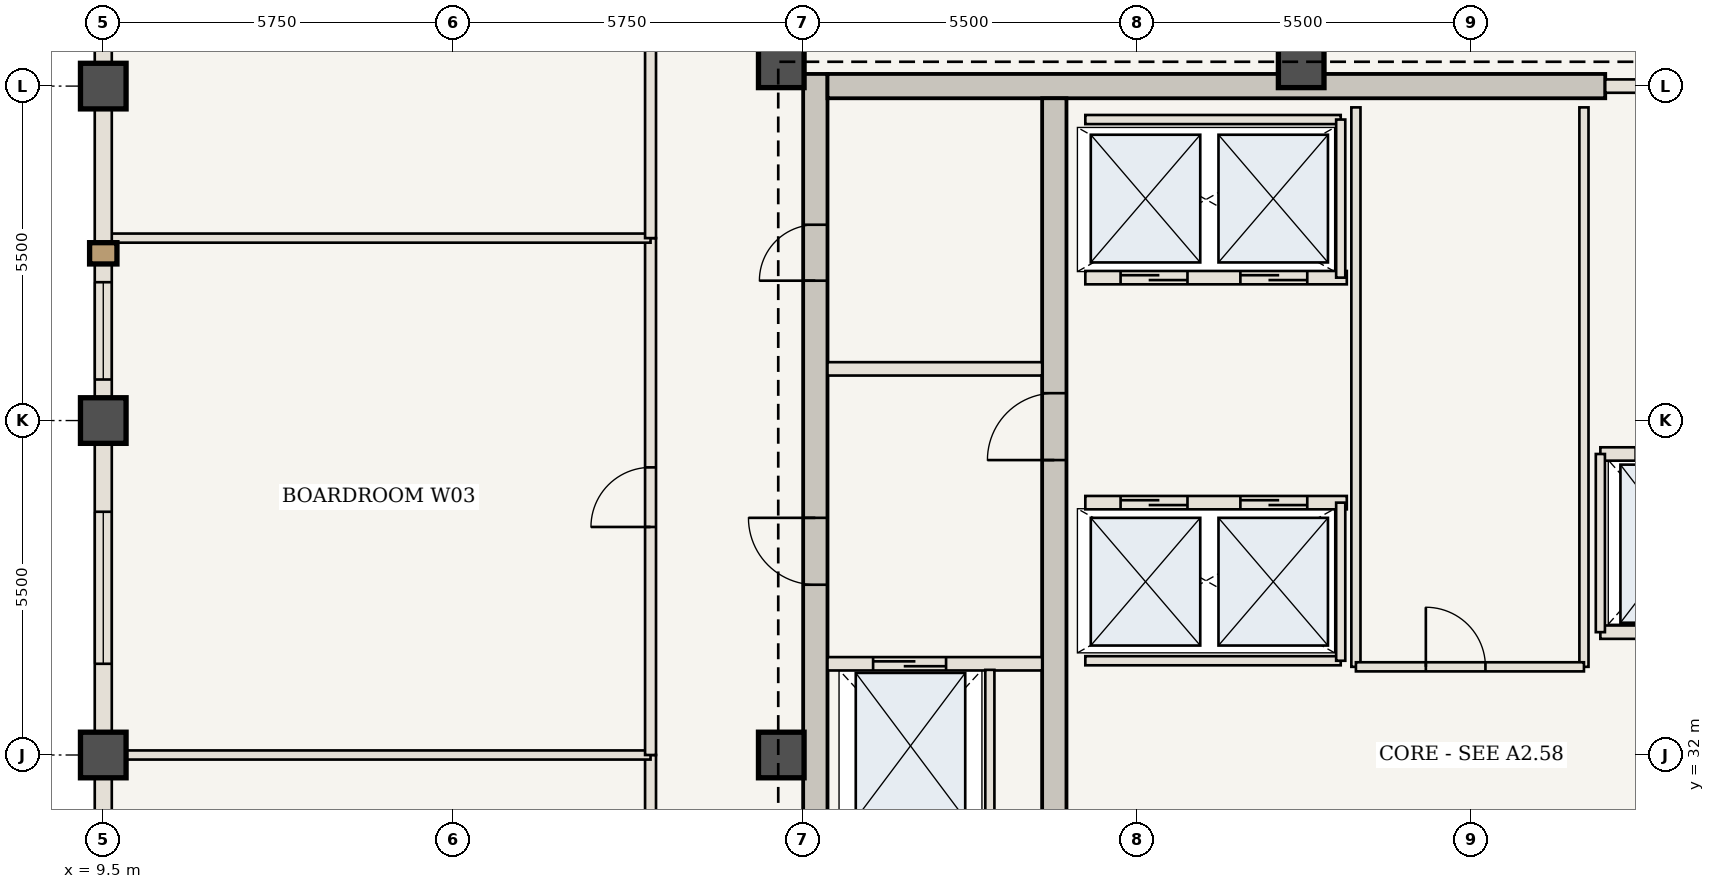
"""IFC4 building model, lengths in metres.
Left out: names, types, materials, properties, quantities, classifications, styles, units other than length and angle.
Written with IfcOpenShell. Run it as: python <this file> out.ifc"""

import sys

from ifc_helpers import new_model, si_unit, direction, frame, frame_2d, origin, origin_2d, place, context, subcontext, project, spatial, rectangle, extrude, element, fill, save


model = new_model("IFC4")
c1 = context("Model", 3, precision=1e-05, world=origin(), true_north=direction((0.0, 1.0)))
c2 = subcontext(c1, "Body", "Model", "MODEL_VIEW")
j1 = project(units=[si_unit("LENGTHUNIT", "METRE"), si_unit("PLANEANGLEUNIT", "RADIAN")], contexts=[c1])
p1 = place(None, origin())
s1 = spatial("IfcSite", under=j1, at=p1, CompositionType="ELEMENT")
p2 = place(p1, origin())
s2 = spatial("IfcBuilding", under=s1, at=p2, CompositionType="ELEMENT")
p3 = place(p2, frame((0.0, 0.0, 262.15)))
s3 = spatial("IfcBuildingStorey", under=s2, at=p3, CompositionType="ELEMENT", Elevation=262.15)
p4 = place(p3, frame((21.21, 30.6, 0.0), z_axis=(0.0, 0.0, 1.0), x_axis=(0.0, 1.0, 0.0)))
e1 = element("IfcWall", 1, at=p4, inside=s3, PredefinedType="SHEAR", context=c2, shape_type="SweptSolid", body=[
    extrude(rectangle(XDim=12.6, YDim=0.4, at=frame_2d((6.3, 0.0))), origin(), (0.0, 0.0, 1.0), 3.85),
])
p5 = place(p4, frame((4.2, 0.0, 0.0)))
e2 = element("IfcOpeningElement", 2, at=p5, cuts=e1, PredefinedType="OPENING", context=c2, shape_type="SweptSolid", body=[
    extrude(rectangle(XDim=1.1, YDim=2.15, at=frame_2d((0.55, 1.075))), frame((0.0, 0.21, 0.0), z_axis=(0.0, -1.0, 0.0), x_axis=(1.0, 0.0, 0.0)), (0.0, 0.0, 1.0), 0.42),
])
p6 = place(p4, frame((9.2, 0.0, 0.0)))
e3 = element("IfcOpeningElement", 3, at=p6, cuts=e1, PredefinedType="OPENING", context=c2, shape_type="SweptSolid", body=[
    extrude(rectangle(XDim=0.92, YDim=2.1, at=frame_2d((0.46, 1.05))), frame((0.0, 0.21, 0.0), z_axis=(0.0, -1.0, 0.0), x_axis=(1.0, 0.0, 0.0)), (0.0, 0.0, 1.0), 0.42),
])
p7 = place(p3, frame((21.41, 43.0, 0.0), z_axis=(0.0, 0.0, 1.0), x_axis=(1.0, 0.0, 0.0)))
e4 = element("IfcWall", 4, at=p7, inside=s3, PredefinedType="SHEAR", context=c2, shape_type="SweptSolid", body=[
    extrude(rectangle(XDim=12.79, YDim=0.4, at=frame_2d((6.395, 0.0))), origin(), (0.0, 0.0, 1.0), 3.85),
])
p8 = place(p3, frame((25.14, 30.6, 0.0), z_axis=(0.0, 0.0, 1.0), x_axis=(0.0, 1.0, 0.0)))
e5 = element("IfcWall", 5, at=p8, inside=s3, PredefinedType="SHEAR", context=c2, shape_type="SweptSolid", body=[
    extrude(rectangle(XDim=12.2, YDim=0.4, at=frame_2d((6.1, 0.0))), origin(), (0.0, 0.0, 1.0), 3.85),
])
p9 = place(p8, frame((6.25, 0.0, 0.0)))
e6 = element("IfcOpeningElement", 6, at=p9, cuts=e5, PredefinedType="OPENING", context=c2, shape_type="SweptSolid", body=[
    extrude(rectangle(XDim=1.1, YDim=2.15, at=frame_2d((0.55, 1.075))), frame((0.0, 0.21, 0.0), z_axis=(0.0, -1.0, 0.0), x_axis=(1.0, 0.0, 0.0)), (0.0, 0.0, 1.0), 0.42),
])
for number, where, z_axis, x_axis in (
    (7, (29.2, 43.35, 0.0), (0.0, 0.0, 1.0), (1.0, 0.0, 0.0)),
    (8, (20.65, 43.35, 0.0), (0.0, 0.0, 1.0), (1.0, 0.0, 0.0)),
    (9, (20.65, 32.0, 0.0), (0.0, 0.0, 1.0), (1.0, 0.0, 0.0)),
    (10, (9.5, 32.0, 0.0), (0.0, 0.0, 1.0), (1.0, 0.0, 0.0)),
    (11, (9.5, 37.5, 0.0), (0.0, 0.0, 1.0), (1.0, 0.0, 0.0)),
    (12, (9.5, 43.0, 0.0), (0.0, 0.0, 1.0), (1.0, 0.0, 0.0)),
):
    element("IfcColumn", number, at=place(p3, frame(where, z_axis=z_axis, x_axis=x_axis)), inside=s3, PredefinedType="COLUMN", context=c2, shape_type="SweptSolid", body=[
        extrude(rectangle(XDim=0.75, YDim=0.75, at=origin_2d()), origin(), (0.0, 0.0, 1.0), 3.85),
    ])
p10 = place(p3, frame((21.41, 33.5, 0.0), z_axis=(0.0, 0.0, 1.0), x_axis=(1.0, 0.0, 0.0)))
e13 = element("IfcWall", 13, at=p10, inside=s3, PredefinedType="STANDARD", context=c2, shape_type="SweptSolid", body=[
    extrude(rectangle(XDim=3.53, YDim=0.22, at=frame_2d((1.765, 0.0))), origin(), (0.0, 0.0, 1.0), 3.43),
])
p11 = place(p10, frame((0.75, 0.0, 0.0)))
e14 = element("IfcOpeningElement", 14, at=p11, cuts=e13, PredefinedType="OPENING", context=c2, shape_type="SweptSolid", body=[
    extrude(rectangle(XDim=1.2, YDim=2.2, at=frame_2d((0.6, 1.1))), frame((0.0, 0.12, 0.0), z_axis=(0.0, -1.0, 0.0), x_axis=(1.0, 0.0, 0.0)), (0.0, 0.0, 1.0), 0.24),
])
p12 = place(p3, frame((24.08, 30.75, 0.0), z_axis=(0.0, 0.0, 1.0), x_axis=(0.0, 1.0, 0.0)))
e15 = element("IfcWall", 15, at=p12, inside=s3, PredefinedType="STANDARD", context=c2, shape_type="SweptSolid", body=[
    extrude(rectangle(XDim=2.65, YDim=0.15, at=frame_2d((1.325, 0.0))), origin(), (0.0, 0.0, 1.0), 3.43),
])
p13 = place(p3, frame((21.41, 38.35, 0.0), z_axis=(0.0, 0.0, 1.0), x_axis=(1.0, 0.0, 0.0)))
e16 = element("IfcWall", 16, at=p13, inside=s3, PredefinedType="STANDARD", context=c2, shape_type="SweptSolid", body=[
    extrude(rectangle(XDim=3.53, YDim=0.22, at=frame_2d((1.765, 0.0))), origin(), (0.0, 0.0, 1.0), 3.43),
])
p14 = place(p3, frame((25.65, 36.15, 0.0), z_axis=(0.0, 0.0, 1.0), x_axis=(1.0, 0.0, 0.0)))
e17 = element("IfcWall", 17, at=p14, inside=s3, PredefinedType="STANDARD", context=c2, shape_type="SweptSolid", body=[
    extrude(rectangle(XDim=4.3, YDim=0.22, at=frame_2d((2.15, 0.0))), origin(), (0.0, 0.0, 1.0), 3.43),
])
p15 = place(p14, frame((0.58, 0.0, 0.0)))
e18 = element("IfcOpeningElement", 18, at=p15, cuts=e17, PredefinedType="OPENING", context=c2, shape_type="SweptSolid", body=[
    extrude(rectangle(XDim=1.1, YDim=2.15, at=frame_2d((0.55, 1.075))), frame((0.0, 0.12, 0.0), z_axis=(0.0, -1.0, 0.0), x_axis=(1.0, 0.0, 0.0)), (0.0, 0.0, 1.0), 0.24),
])
p16 = place(p14, frame((2.55, 0.0, 0.0)))
e19 = element("IfcOpeningElement", 19, at=p16, cuts=e17, PredefinedType="OPENING", context=c2, shape_type="SweptSolid", body=[
    extrude(rectangle(XDim=1.1, YDim=2.15, at=frame_2d((0.55, 1.075))), frame((0.0, 0.12, 0.0), z_axis=(0.0, -1.0, 0.0), x_axis=(1.0, 0.0, 0.0)), (0.0, 0.0, 1.0), 0.24),
])
p17 = place(p3, frame((25.65, 33.55, 0.0), z_axis=(0.0, 0.0, 1.0), x_axis=(1.0, 0.0, 0.0)))
e20 = element("IfcWall", 20, at=p17, inside=s3, PredefinedType="STANDARD", context=c2, shape_type="SweptSolid", body=[
    extrude(rectangle(XDim=4.2, YDim=0.15, at=frame_2d((2.1, 0.0))), origin(), (0.0, 0.0, 1.0), 3.43),
])
p18 = place(p3, frame((29.85, 33.55, 0.0), z_axis=(0.0, 0.0, 1.0), x_axis=(0.0, 1.0, 0.0)))
e21 = element("IfcWall", 21, at=p18, inside=s3, PredefinedType="STANDARD", context=c2, shape_type="SweptSolid", body=[
    extrude(rectangle(XDim=2.6, YDim=0.15, at=frame_2d((1.3, 0.0))), origin(), (0.0, 0.0, 1.0), 3.43),
])
p19 = place(p3, frame((25.65, 39.85, 0.0), z_axis=(0.0, 0.0, 1.0), x_axis=(1.0, 0.0, 0.0)))
e22 = element("IfcWall", 22, at=p19, inside=s3, PredefinedType="STANDARD", context=c2, shape_type="SweptSolid", body=[
    extrude(rectangle(XDim=4.3, YDim=0.22, at=frame_2d((2.15, 0.0))), origin(), (0.0, 0.0, 1.0), 3.43),
])
p20 = place(p19, frame((0.58, 0.0, 0.0)))
e23 = element("IfcOpeningElement", 23, at=p20, cuts=e22, PredefinedType="OPENING", context=c2, shape_type="SweptSolid", body=[
    extrude(rectangle(XDim=1.1, YDim=2.15, at=frame_2d((0.55, 1.075))), frame((0.0, 0.12, 0.0), z_axis=(0.0, -1.0, 0.0), x_axis=(1.0, 0.0, 0.0)), (0.0, 0.0, 1.0), 0.24),
])
p21 = place(p19, frame((2.55, 0.0, 0.0)))
e24 = element("IfcOpeningElement", 24, at=p21, cuts=e22, PredefinedType="OPENING", context=c2, shape_type="SweptSolid", body=[
    extrude(rectangle(XDim=1.1, YDim=2.15, at=frame_2d((0.55, 1.075))), frame((0.0, 0.12, 0.0), z_axis=(0.0, -1.0, 0.0), x_axis=(1.0, 0.0, 0.0)), (0.0, 0.0, 1.0), 0.24),
])
p22 = place(p3, frame((25.65, 42.45, 0.0), z_axis=(0.0, 0.0, 1.0), x_axis=(1.0, 0.0, 0.0)))
e25 = element("IfcWall", 25, at=p22, inside=s3, PredefinedType="STANDARD", context=c2, shape_type="SweptSolid", body=[
    extrude(rectangle(XDim=4.2, YDim=0.15, at=frame_2d((2.1, 0.0))), origin(), (0.0, 0.0, 1.0), 3.43),
])
p23 = place(p3, frame((29.85, 39.85, 0.0), z_axis=(0.0, 0.0, 1.0), x_axis=(0.0, 1.0, 0.0)))
e26 = element("IfcWall", 26, at=p23, inside=s3, PredefinedType="STANDARD", context=c2, shape_type="SweptSolid", body=[
    extrude(rectangle(XDim=2.6, YDim=0.15, at=frame_2d((1.3, 0.0))), origin(), (0.0, 0.0, 1.0), 3.43),
])
for number, where, z_axis, x_axis in (
    (27, (30.1, 33.45, 0.0), (0.0, 0.0, 1.0), (0.0, 1.0, 0.0)),
    (28, (33.85, 33.45, 0.0), (0.0, 0.0, 1.0), (0.0, 1.0, 0.0)),
):
    element("IfcWall", number, at=place(p3, frame(where, z_axis=z_axis, x_axis=x_axis)), inside=s3, PredefinedType="STANDARD", context=c2, shape_type="SweptSolid", body=[
        extrude(rectangle(XDim=9.2, YDim=0.15, at=frame_2d((4.6, 0.0))), origin(), (0.0, 0.0, 1.0), 3.43),
    ])
p24 = place(p3, frame((30.1, 33.45, 0.0), z_axis=(0.0, 0.0, 1.0), x_axis=(1.0, 0.0, 0.0)))
e29 = element("IfcWall", 29, at=p24, inside=s3, PredefinedType="STANDARD", context=c2, shape_type="SweptSolid", body=[
    extrude(rectangle(XDim=3.75, YDim=0.15, at=frame_2d((1.875, 0.0))), origin(), (0.0, 0.0, 1.0), 3.43),
])
p25 = place(p24, frame((1.15, 0.0, 0.0)))
e30 = element("IfcOpeningElement", 30, at=p25, cuts=e29, PredefinedType="OPENING", context=c2, shape_type="SweptSolid", body=[
    extrude(rectangle(XDim=0.98, YDim=2.2, at=frame_2d((0.49, 1.1))), frame((0.0, 0.085, 0.0), z_axis=(0.0, -1.0, 0.0), x_axis=(1.0, 0.0, 0.0)), (0.0, 0.0, 1.0), 0.17),
])
p26 = place(p3, frame((34.2, 43.0, 0.0), z_axis=(0.0, 0.0, 1.0), x_axis=(1.0, 0.0, 0.0)))
e31 = element("IfcWall", 31, at=p26, inside=s3, PredefinedType="STANDARD", context=c2, shape_type="SweptSolid", body=[
    extrude(rectangle(XDim=3.55, YDim=0.22, at=frame_2d((1.775, 0.0))), origin(), (0.0, 0.0, 1.0), 3.43),
])
p27 = place(p26, frame((1.4, 0.0, 0.0)))
e32 = element("IfcOpeningElement", 32, at=p27, cuts=e31, PredefinedType="OPENING", context=c2, shape_type="SweptSolid", body=[
    extrude(rectangle(XDim=1.1, YDim=2.15, at=frame_2d((0.55, 1.075))), frame((0.0, 0.12, 0.0), z_axis=(0.0, -1.0, 0.0), x_axis=(1.0, 0.0, 0.0)), (0.0, 0.0, 1.0), 0.24),
])
p28 = place(p3, frame((34.12, 36.95, 0.0), z_axis=(0.0, 0.0, 1.0), x_axis=(1.0, 0.0, 0.0)))
e33 = element("IfcWall", 33, at=p28, inside=s3, PredefinedType="STANDARD", context=c2, shape_type="SweptSolid", body=[
    extrude(rectangle(XDim=2.68, YDim=0.22, at=frame_2d((1.34, 0.0))), origin(), (0.0, 0.0, 1.0), 3.43),
])
p29 = place(p28, frame((0.58, 0.0, 0.0)))
e34 = element("IfcOpeningElement", 34, at=p29, cuts=e33, PredefinedType="OPENING", context=c2, shape_type="SweptSolid", body=[
    extrude(rectangle(XDim=1.2, YDim=2.2, at=frame_2d((0.6, 1.1))), frame((0.0, 0.12, 0.0), z_axis=(0.0, -1.0, 0.0), x_axis=(1.0, 0.0, 0.0)), (0.0, 0.0, 1.0), 0.24),
])
p30 = place(p3, frame((34.12, 34.02, 0.0), z_axis=(0.0, 0.0, 1.0), x_axis=(1.0, 0.0, 0.0)))
e35 = element("IfcWall", 35, at=p30, inside=s3, PredefinedType="STANDARD", context=c2, shape_type="SweptSolid", body=[
    extrude(rectangle(XDim=2.68, YDim=0.22, at=frame_2d((1.34, 0.0))), origin(), (0.0, 0.0, 1.0), 3.43),
])
p31 = place(p3, frame((34.12, 34.02, 0.0), z_axis=(0.0, 0.0, 1.0), x_axis=(0.0, 1.0, 0.0)))
e36 = element("IfcWall", 36, at=p31, inside=s3, PredefinedType="STANDARD", context=c2, shape_type="SweptSolid", body=[
    extrude(rectangle(XDim=2.93, YDim=0.15, at=frame_2d((1.465, 0.0))), origin(), (0.0, 0.0, 1.0), 3.43),
])
p32 = place(p3, frame((18.5, 23.5, 0.0), z_axis=(0.0, 0.0, 1.0), x_axis=(0.0, 1.0, 0.0)))
e37 = element("IfcWall", 37, at=p32, inside=s3, PredefinedType="STANDARD", context=c2, shape_type="SweptSolid", body=[
    extrude(rectangle(XDim=8.5, YDim=0.18, at=frame_2d((4.25, 0.0))), origin(), (0.0, 0.0, 1.0), 3.43),
])
p33 = place(p32, frame((3.75, 0.0, 0.0)))
e38 = element("IfcOpeningElement", 38, at=p33, cuts=e37, PredefinedType="OPENING", context=c2, shape_type="SweptSolid", body=[
    extrude(rectangle(XDim=0.98, YDim=2.2, at=frame_2d((0.49, 1.1))), frame((0.0, 0.1, 0.0), z_axis=(0.0, -1.0, 0.0), x_axis=(1.0, 0.0, 0.0)), (0.0, 0.0, 1.0), 0.2),
])
p34 = place(p3, frame((9.56, 32.0, 0.0), z_axis=(0.0, 0.0, 1.0), x_axis=(1.0, 0.0, 0.0)))
e39 = element("IfcWall", 39, at=p34, inside=s3, PredefinedType="STANDARD", context=c2, shape_type="SweptSolid", body=[
    extrude(rectangle(XDim=8.94, YDim=0.15, at=frame_2d((4.47, 0.0))), origin(), (0.0, 0.0, 1.0), 2.885),
])
p35 = place(p3, frame((18.5, 32.0, 0.0), z_axis=(0.0, 0.0, 1.0), x_axis=(0.0, 1.0, 0.0)))
e40 = element("IfcWall", 40, at=p35, inside=s3, PredefinedType="STANDARD", context=c2, shape_type="SweptSolid", body=[
    extrude(rectangle(XDim=8.5, YDim=0.18, at=frame_2d((4.25, 0.0))), origin(), (0.0, 0.0, 1.0), 3.43),
])
p36 = place(p35, frame((3.75, 0.0, 0.0)))
e41 = element("IfcOpeningElement", 41, at=p36, cuts=e40, PredefinedType="OPENING", context=c2, shape_type="SweptSolid", body=[
    extrude(rectangle(XDim=0.98, YDim=2.2, at=frame_2d((0.49, 1.1))), frame((0.0, 0.1, 0.0), z_axis=(0.0, -1.0, 0.0), x_axis=(1.0, 0.0, 0.0)), (0.0, 0.0, 1.0), 0.2),
])
p37 = place(p3, frame((9.56, 40.5, 0.0), z_axis=(0.0, 0.0, 1.0), x_axis=(1.0, 0.0, 0.0)))
e42 = element("IfcWall", 42, at=p37, inside=s3, PredefinedType="STANDARD", context=c2, shape_type="SweptSolid", body=[
    extrude(rectangle(XDim=8.94, YDim=0.15, at=frame_2d((4.47, 0.0))), origin(), (0.0, 0.0, 1.0), 3.43),
])
p38 = place(p3, frame((18.5, 40.5, 0.0), z_axis=(0.0, 0.0, 1.0), x_axis=(0.0, 1.0, 0.0)))
e43 = element("IfcWall", 43, at=p38, inside=s3, PredefinedType="STANDARD", context=c2, shape_type="SweptSolid", body=[
    extrude(rectangle(XDim=8.0, YDim=0.18, at=frame_2d((4.0, 0.0))), origin(), (0.0, 0.0, 1.0), 3.43),
])
p39 = place(p38, frame((4.95, 0.0, 0.0)))
e44 = element("IfcOpeningElement", 44, at=p39, cuts=e43, PredefinedType="OPENING", context=c2, shape_type="SweptSolid", body=[
    extrude(rectangle(XDim=0.98, YDim=2.2, at=frame_2d((0.49, 1.1))), frame((0.0, 0.1, 0.0), z_axis=(0.0, -1.0, 0.0), x_axis=(1.0, 0.0, 0.0)), (0.0, 0.0, 1.0), 0.2),
])
p40 = place(p3, frame((9.5, 26.5, 0.0), z_axis=(0.0, 0.0, 1.0), x_axis=(0.0, 1.0, 0.0)))
e45 = element("IfcWall", 45, at=p40, inside=s3, PredefinedType="USERDEFINED", context=c2, shape_type="SweptSolid", body=[
    extrude(rectangle(XDim=5.5, YDim=0.28, at=frame_2d((2.75, 0.0))), origin(), (0.0, 0.0, 1.0), 2.73),
])
p41 = place(p40, frame((1.5, 0.0, 0.85)))
e46 = element("IfcOpeningElement", 46, at=p41, cuts=e45, PredefinedType="OPENING", context=c2, shape_type="SweptSolid", body=[
    extrude(rectangle(XDim=2.5, YDim=1.68, at=frame_2d((1.25, 0.84))), frame((0.0, 0.15, 0.0), z_axis=(0.0, -1.0, 0.0), x_axis=(1.0, 0.0, 0.0)), (0.0, 0.0, 1.0), 0.3),
])
p42 = place(p3, frame((9.5, 32.0, 0.0), z_axis=(0.0, 0.0, 1.0), x_axis=(0.0, 1.0, 0.0)))
e47 = element("IfcWall", 47, at=p42, inside=s3, PredefinedType="USERDEFINED", context=c2, shape_type="SweptSolid", body=[
    extrude(rectangle(XDim=5.5, YDim=0.28, at=frame_2d((2.75, 0.0))), origin(), (0.0, 0.0, 1.0), 2.73),
])
p43 = place(p42, frame((1.5, 0.0, 0.85)))
e48 = element("IfcOpeningElement", 48, at=p43, cuts=e47, PredefinedType="OPENING", context=c2, shape_type="SweptSolid", body=[
    extrude(rectangle(XDim=2.5, YDim=1.68, at=frame_2d((1.25, 0.84))), frame((0.0, 0.15, 0.0), z_axis=(0.0, -1.0, 0.0), x_axis=(1.0, 0.0, 0.0)), (0.0, 0.0, 1.0), 0.3),
])
p44 = place(p3, frame((9.5, 37.5, 0.0), z_axis=(0.0, 0.0, 1.0), x_axis=(0.0, 1.0, 0.0)))
e49 = element("IfcWall", 49, at=p44, inside=s3, PredefinedType="USERDEFINED", context=c2, shape_type="SweptSolid", body=[
    extrude(rectangle(XDim=5.5, YDim=0.28, at=frame_2d((2.75, 0.0))), origin(), (0.0, 0.0, 1.0), 2.73),
])
p45 = place(p44, frame((0.675, 0.0, 0.85)))
e50 = element("IfcOpeningElement", 50, at=p45, cuts=e49, PredefinedType="OPENING", context=c2, shape_type="SweptSolid", body=[
    extrude(rectangle(XDim=1.6, YDim=1.68, at=frame_2d((0.8, 0.84))), frame((0.0, 0.15, 0.0), z_axis=(0.0, -1.0, 0.0), x_axis=(1.0, 0.0, 0.0)), (0.0, 0.0, 1.0), 0.3),
])
p46 = place(p3, frame((9.5, 43.0, 0.0), z_axis=(0.0, 0.0, 1.0), x_axis=(0.0, 1.0, 0.0)))
e51 = element("IfcWall", 51, at=p46, inside=s3, PredefinedType="USERDEFINED", context=c2, shape_type="SweptSolid", body=[
    extrude(rectangle(XDim=5.5, YDim=0.28, at=frame_2d((2.75, 0.0))), origin(), (0.0, 0.0, 1.0), 2.73),
])
p47 = place(p5, origin())
e52 = element("IfcDoor", 52, at=p47, inside=s3, OperationType="SINGLE_SWING_RIGHT", PredefinedType="DOOR", context=c2, shape_type="SweptSolid", body=[
    extrude(rectangle(XDim=1.1, YDim=2.15, at=frame_2d((0.55, 1.075))), frame((0.0, 0.025, 0.0), z_axis=(0.0, -1.0, 0.0), x_axis=(1.0, 0.0, 0.0)), (0.0, 0.0, 1.0), 0.05),
])
fill(e2, e52)
p48 = place(p9, origin())
e53 = element("IfcDoor", 53, at=p48, inside=s3, OperationType="SINGLE_SWING_LEFT", PredefinedType="DOOR", context=c2, shape_type="SweptSolid", body=[
    extrude(rectangle(XDim=1.1, YDim=2.15, at=frame_2d((0.55, 1.075))), frame((0.0, 0.025, 0.0), z_axis=(0.0, -1.0, 0.0), x_axis=(1.0, 0.0, 0.0)), (0.0, 0.0, 1.0), 0.05),
])
fill(e6, e53)
p49 = place(p6, origin())
e54 = element("IfcDoor", 54, at=p49, inside=s3, OperationType="SINGLE_SWING_LEFT", PredefinedType="DOOR", context=c2, shape_type="SweptSolid", body=[
    extrude(rectangle(XDim=0.92, YDim=2.1, at=frame_2d((0.46, 1.05))), frame((0.0, 0.025, 0.0), z_axis=(0.0, -1.0, 0.0), x_axis=(1.0, 0.0, 0.0)), (0.0, 0.0, 1.0), 0.05),
])
fill(e3, e54)
p50 = place(p11, origin())
e55 = element("IfcDoor", 55, at=p50, inside=s3, OperationType="DOUBLE_DOOR_SLIDING", PredefinedType="DOOR", context=c2, shape_type="SweptSolid", body=[
    extrude(rectangle(XDim=1.2, YDim=2.2, at=frame_2d((0.6, 1.1))), frame((0.0, 0.025, 0.0), z_axis=(0.0, -1.0, 0.0), x_axis=(1.0, 0.0, 0.0)), (0.0, 0.0, 1.0), 0.05),
])
fill(e14, e55)
p51 = place(p15, origin())
e56 = element("IfcDoor", 56, at=p51, inside=s3, OperationType="DOUBLE_DOOR_SLIDING", PredefinedType="DOOR", context=c2, shape_type="SweptSolid", body=[
    extrude(rectangle(XDim=1.1, YDim=2.15, at=frame_2d((0.55, 1.075))), frame((0.0, 0.025, 0.0), z_axis=(0.0, -1.0, 0.0), x_axis=(1.0, 0.0, 0.0)), (0.0, 0.0, 1.0), 0.05),
])
fill(e18, e56)
p52 = place(p16, origin())
e57 = element("IfcDoor", 57, at=p52, inside=s3, OperationType="DOUBLE_DOOR_SLIDING", PredefinedType="DOOR", context=c2, shape_type="SweptSolid", body=[
    extrude(rectangle(XDim=1.1, YDim=2.15, at=frame_2d((0.55, 1.075))), frame((0.0, 0.025, 0.0), z_axis=(0.0, -1.0, 0.0), x_axis=(1.0, 0.0, 0.0)), (0.0, 0.0, 1.0), 0.05),
])
fill(e19, e57)
p53 = place(p20, origin())
e58 = element("IfcDoor", 58, at=p53, inside=s3, OperationType="DOUBLE_DOOR_SLIDING", PredefinedType="DOOR", context=c2, shape_type="SweptSolid", body=[
    extrude(rectangle(XDim=1.1, YDim=2.15, at=frame_2d((0.55, 1.075))), frame((0.0, 0.025, 0.0), z_axis=(0.0, -1.0, 0.0), x_axis=(1.0, 0.0, 0.0)), (0.0, 0.0, 1.0), 0.05),
])
fill(e23, e58)
p54 = place(p21, origin())
e59 = element("IfcDoor", 59, at=p54, inside=s3, OperationType="DOUBLE_DOOR_SLIDING", PredefinedType="DOOR", context=c2, shape_type="SweptSolid", body=[
    extrude(rectangle(XDim=1.1, YDim=2.15, at=frame_2d((0.55, 1.075))), frame((0.0, 0.025, 0.0), z_axis=(0.0, -1.0, 0.0), x_axis=(1.0, 0.0, 0.0)), (0.0, 0.0, 1.0), 0.05),
])
fill(e24, e59)
p55 = place(p25, origin())
e60 = element("IfcDoor", 60, at=p55, inside=s3, OperationType="SINGLE_SWING_LEFT", PredefinedType="DOOR", context=c2, shape_type="SweptSolid", body=[
    extrude(rectangle(XDim=0.98, YDim=2.2, at=frame_2d((0.49, 1.1))), frame((0.0, 0.025, 0.0), z_axis=(0.0, -1.0, 0.0), x_axis=(1.0, 0.0, 0.0)), (0.0, 0.0, 1.0), 0.05),
])
fill(e30, e60)
p56 = place(p36, origin())
e61 = element("IfcDoor", 61, at=p56, inside=s3, OperationType="SINGLE_SWING_LEFT", PredefinedType="DOOR", context=c2, shape_type="SweptSolid", body=[
    extrude(rectangle(XDim=0.98, YDim=2.2, at=frame_2d((0.49, 1.1))), frame((0.0, 0.025, 0.0), z_axis=(0.0, -1.0, 0.0), x_axis=(1.0, 0.0, 0.0)), (0.0, 0.0, 1.0), 0.05),
])
fill(e41, e61)
p57 = place(p43, origin())
e62 = element("IfcWindow", 62, at=p57, inside=s3, PartitioningType="SINGLE_PANEL", PredefinedType="WINDOW", context=c2, shape_type="SweptSolid", body=[
    extrude(rectangle(XDim=2.5, YDim=1.68, at=frame_2d((1.25, 0.84))), frame((0.0, 0.03, 0.0), z_axis=(0.0, -1.0, 0.0), x_axis=(1.0, 0.0, 0.0)), (0.0, 0.0, 1.0), 0.06),
])
fill(e48, e62)
p58 = place(p45, origin())
e63 = element("IfcWindow", 63, at=p58, inside=s3, PartitioningType="SINGLE_PANEL", PredefinedType="WINDOW", context=c2, shape_type="SweptSolid", body=[
    extrude(rectangle(XDim=1.6, YDim=1.68, at=frame_2d((0.8, 0.84))), frame((0.0, 0.03, 0.0), z_axis=(0.0, -1.0, 0.0), x_axis=(1.0, 0.0, 0.0)), (0.0, 0.0, 1.0), 0.06),
])
fill(e50, e63)
save(model, sys.argv[1])
